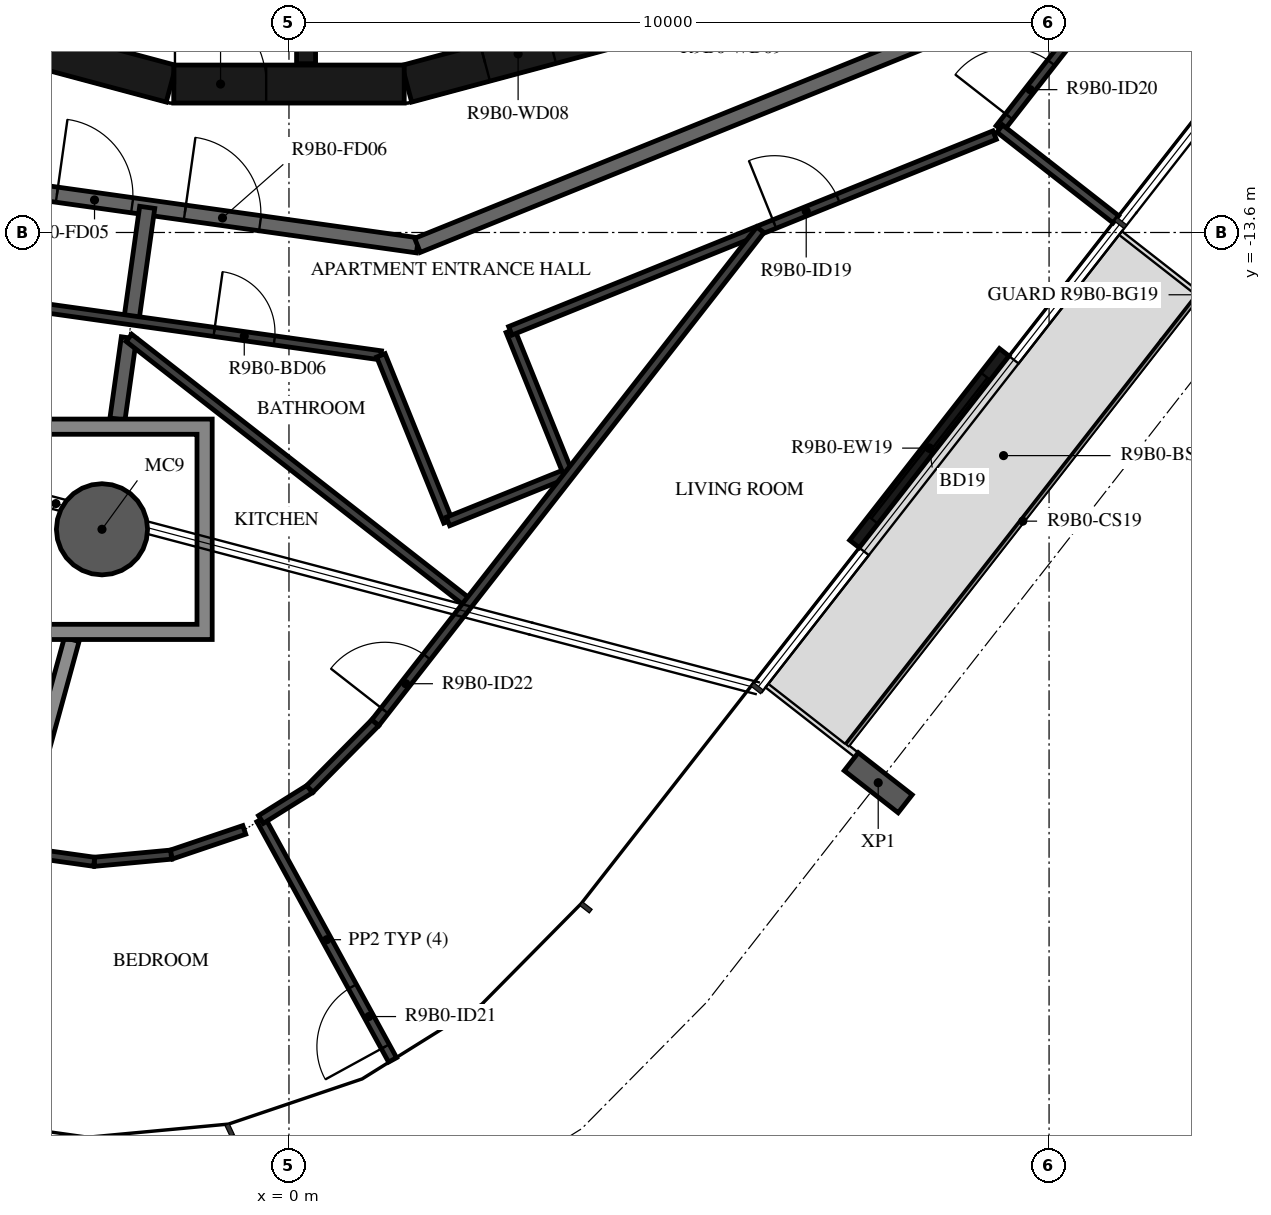
"""IFC4 building model, lengths in metres.
Left out: names, types, materials, properties, quantities, classifications, styles, units other than length and angle.
Written with IfcOpenShell. Run it as: python <this file> out.ifc"""

import sys

from ifc_helpers import new_model, si_unit, direction, frame, frame_2d, origin, origin_2d, place, context, subcontext, project, spatial, polyline, rectangle, hollow_circle, i_section, outline, extrude, element, fill, save


model = new_model("IFC4")
c1 = context("Model", 3, precision=1e-05, world=origin(), true_north=direction((0.0, 1.0)))
c2 = subcontext(c1, "Body", "Model", "MODEL_VIEW")
j1 = project(units=[si_unit("LENGTHUNIT", "METRE"), si_unit("PLANEANGLEUNIT", "RADIAN")], contexts=[c1])
p1 = place(None, origin())
s1 = spatial("IfcSite", under=j1, at=p1, CompositionType="ELEMENT")
p2 = place(p1, origin())
s2 = spatial("IfcBuilding", under=s1, at=p2, CompositionType="ELEMENT")
p3 = place(p2, frame((0.0, 0.0, 347.0)))
s3 = spatial("IfcBuildingStorey", under=s2, at=p3, CompositionType="ELEMENT", Elevation=347.0)
p4 = place(p3, frame((-2.46, -17.505, -0.38), z_axis=(0.0, 0.0, 1.0), x_axis=(1.0, 0.0, 0.0)))
e1 = element("IfcColumn", 1, at=p4, inside=s3, PredefinedType="COLUMN", context=c2, shape_type="SweptSolid", body=[
    extrude(hollow_circle(Radius=0.6, WallThickness=0.03, at=origin_2d()), origin(), (0.0, 0.0, 1.0), 3.5),
])
p5 = place(p3, frame((7.752, -20.839, -0.38), z_axis=(0.0, 0.0, 1.0), x_axis=(-0.615661060634, -0.788011077599, 0.0)))
e2 = element("IfcColumn", 2, at=p5, inside=s3, PredefinedType="COLUMN", context=c2, shape_type="SweptSolid", body=[
    extrude(i_section(OverallWidth=0.3, OverallDepth=0.9, WebThickness=0.019, FlangeThickness=0.035, FilletRadius=0.03, at=origin_2d()), origin(), (0.0, 0.0, 1.0), 3.5),
])
p6 = place(p3, frame((7.44, -17.698, 0.0), z_axis=(0.0, 0.0, 1.0), x_axis=(0.615666248856, 0.788007024093, 0.0)))
e3 = element("IfcWall", 3, at=p6, inside=s3, PredefinedType="STANDARD", context=c2, shape_type="SweptSolid", body=[
    extrude(rectangle(XDim=3.2, YDim=0.16, at=frame_2d((1.6, 0.0))), origin(), (0.0, 0.0, 1.0), 3.12),
])
p7 = place(p6, frame((0.4, 0.0, 0.0)))
e4 = element("IfcOpeningElement", 4, at=p7, cuts=e3, PredefinedType="OPENING", context=c2, shape_type="SweptSolid", body=[
    extrude(rectangle(XDim=2.4, YDim=2.4, at=frame_2d((1.2, 1.2))), frame((0.0, 0.09, 0.0), z_axis=(0.0, -1.0, 0.0), x_axis=(1.0, 0.0, 0.0)), (0.0, 0.0, 1.0), 0.18),
])
p8 = place(p3, frame((1.55, -11.643, 0.0), z_axis=(0.0, 0.0, 1.0), x_axis=(0.965948410781, 0.258734743916, 0.0)))
e5 = element("IfcWall", 5, at=p8, inside=s3, PredefinedType="SHEAR", context=c2, shape_type="SweptSolid", body=[
    extrude(rectangle(XDim=3.033, YDim=0.5, at=frame_2d((1.516, 0.0))), origin(), (0.0, 0.0, 1.0), 3.12),
])
p9 = place(p8, frame((1.066, 0.0, 0.0)))
e6 = element("IfcOpeningElement", 6, at=p9, cuts=e5, PredefinedType="OPENING", context=c2, shape_type="SweptSolid", body=[
    extrude(rectangle(XDim=0.9, YDim=2.1, at=frame_2d((0.45, 1.05))), frame((0.0, 0.26, 0.0), z_axis=(0.0, -1.0, 0.0), x_axis=(1.0, 0.0, 0.0)), (0.0, 0.0, 1.0), 0.52),
])
p10 = place(p3, frame((-4.479, -10.858, 0.0), z_axis=(0.0, 0.0, 1.0), x_axis=(0.965948410781, -0.258734743916, 0.0)))
e7 = element("IfcWall", 7, at=p10, inside=s3, PredefinedType="SHEAR", context=c2, shape_type="SweptSolid", body=[
    extrude(rectangle(XDim=3.033, YDim=0.5, at=frame_2d((1.516, 0.0))), origin(), (0.0, 0.0, 1.0), 3.12),
])
p11 = place(p3, frame((-1.516, -11.647, 0.0), z_axis=(0.0, 0.0, 1.0), x_axis=(1.0, 0.0, 0.0)))
e8 = element("IfcWall", 8, at=p11, inside=s3, PredefinedType="SHEAR", context=c2, shape_type="SweptSolid", body=[
    extrude(rectangle(XDim=3.033, YDim=0.5, at=frame_2d((1.516, 0.0))), origin(), (0.0, 0.0, 1.0), 3.12),
])
p12 = place(p11, frame((0.016, 0.0, 0.0)))
e9 = element("IfcOpeningElement", 9, at=p12, cuts=e8, PredefinedType="OPENING", context=c2, shape_type="SweptSolid", body=[
    extrude(rectangle(XDim=1.2, YDim=2.1, at=frame_2d((0.6, 1.05))), frame((0.0, 0.26, 0.0), z_axis=(0.0, -1.0, 0.0), x_axis=(1.0, 0.0, 0.0)), (0.0, 0.0, 1.0), 0.52),
])
p13 = place(p3, frame((0.225, -8.97, 0.0), z_axis=(0.0, 0.0, 1.0), x_axis=(0.0, -1.0, 0.0)))
e10 = element("IfcWall", 10, at=p13, inside=s3, PredefinedType="SHEAR", context=c2, shape_type="SweptSolid", body=[
    extrude(rectangle(XDim=2.41, YDim=0.25, at=frame_2d((1.205, 0.0))), origin(), (0.0, 0.0, 1.0), 3.12),
])
p14 = place(p3, frame((-5.42, -12.77, 0.0), z_axis=(0.0, 0.0, 1.0), x_axis=(0.990270565508, -0.139155334385, 0.0)))
e11 = element("IfcWall", 11, at=p14, inside=s3, PredefinedType="STANDARD", context=c2, shape_type="SweptSolid", body=[
    extrude(rectangle(XDim=7.181, YDim=0.2, at=frame_2d((3.59, 0.0))), origin(), (0.0, 0.0, 1.0), 3.12),
])
p15 = place(p14, frame((2.39, 0.0, 0.0)))
e12 = element("IfcOpeningElement", 12, at=p15, cuts=e11, PredefinedType="OPENING", context=c2, shape_type="SweptSolid", body=[
    extrude(rectangle(XDim=1.0, YDim=2.1, at=frame_2d((0.5, 1.05))), frame((0.0, 0.11, 0.0), z_axis=(0.0, -1.0, 0.0), x_axis=(1.0, 0.0, 0.0)), (0.0, 0.0, 1.0), 0.22),
])
p16 = place(p14, frame((4.091, 0.0, 0.0)))
e13 = element("IfcOpeningElement", 13, at=p16, cuts=e11, PredefinedType="OPENING", context=c2, shape_type="SweptSolid", body=[
    extrude(rectangle(XDim=1.0, YDim=2.1, at=frame_2d((0.5, 1.05))), frame((0.0, 0.11, 0.0), z_axis=(0.0, -1.0, 0.0), x_axis=(1.0, 0.0, 0.0)), (0.0, 0.0, 1.0), 0.22),
])
p17 = place(p3, frame((1.691, -13.769, 0.0), z_axis=(0.0, 0.0, 1.0), x_axis=(0.92717916932, 0.374618189599, 0.0)))
e14 = element("IfcWall", 14, at=p17, inside=s3, PredefinedType="STANDARD", context=c2, shape_type="SweptSolid", body=[
    extrude(rectangle(XDim=7.181, YDim=0.2, at=frame_2d((3.591, 0.0))), origin(), (0.0, 0.0, 1.0), 3.12),
])
p18 = place(p3, frame((-2.073, -14.755, 0.0), z_axis=(0.0, 0.0, 1.0), x_axis=(0.139005431033, 0.990291618738, 0.0)))
e15 = element("IfcWall", 15, at=p18, inside=s3, PredefinedType="STANDARD", context=c2, shape_type="SweptSolid", body=[
    extrude(rectangle(XDim=1.5, YDim=0.2, at=frame_2d((0.75, 0.0))), origin(), (0.0, 0.0, 1.0), 3.12),
])
p19 = place(p3, frame((-2.256, -16.055, 0.0), z_axis=(0.0, 0.0, 1.0), x_axis=(0.139109268657, 0.990277037689, 0.0)))
e16 = element("IfcWall", 16, at=p19, inside=s3, PredefinedType="STANDARD", context=c2, shape_type="SweptSolid", body=[
    extrude(rectangle(XDim=1.079, YDim=0.2, at=frame_2d((0.54, 0.0))), origin(), (0.0, 0.0, 1.0), 3.12),
])
p20 = place(p3, frame((-4.574, -25.21, 0.0), z_axis=(0.0, 0.0, 1.0), x_axis=(0.264579024648, 0.964364007892, 0.0)))
e17 = element("IfcWall", 17, at=p20, inside=s3, PredefinedType="STANDARD", context=c2, shape_type="SweptSolid", body=[
    extrude(rectangle(XDim=6.486, YDim=0.2, at=frame_2d((3.243, 0.0))), origin(), (0.0, 0.0, 1.0), 2.73),
])
p21 = place(p3, frame((-6.027, -14.199, 0.0), z_axis=(0.0, 0.0, 1.0), x_axis=(0.990271617837, -0.139147845494, 0.0)))
e18 = element("IfcWall", 18, at=p21, inside=s3, PredefinedType="PARTITIONING", context=c2, shape_type="SweptSolid", body=[
    extrude(rectangle(XDim=7.308, YDim=0.12, at=frame_2d((3.654, 0.0))), origin(), (0.0, 0.0, 1.0), 3.12),
])
p22 = place(p21, frame((5.093, 0.0, 0.0)))
e19 = element("IfcOpeningElement", 19, at=p22, cuts=e18, PredefinedType="OPENING", context=c2, shape_type="SweptSolid", body=[
    extrude(rectangle(XDim=0.8, YDim=2.1, at=frame_2d((0.4, 1.05))), frame((0.0, 0.07, 0.0), z_axis=(0.0, -1.0, 0.0), x_axis=(1.0, 0.0, 0.0)), (0.0, 0.0, 1.0), 0.14),
])
p23 = place(p3, frame((1.209, -15.216, 0.0), z_axis=(0.0, 0.0, 1.0), x_axis=(0.374531550488, -0.927214170345, 0.0)))
e20 = element("IfcWall", 20, at=p23, inside=s3, PredefinedType="PARTITIONING", context=c2, shape_type="SweptSolid", body=[
    extrude(rectangle(XDim=2.357, YDim=0.12, at=frame_2d((1.179, 0.0))), origin(), (0.0, 0.0, 1.0), 3.12),
])
p24 = place(p3, frame((2.092, -17.402, 0.0), z_axis=(0.0, 0.0, 1.0), x_axis=(0.927153589835, 0.374681492546, 0.0)))
e21 = element("IfcWall", 21, at=p24, inside=s3, PredefinedType="PARTITIONING", context=c2, shape_type="SweptSolid", body=[
    extrude(rectangle(XDim=1.7, YDim=0.12, at=frame_2d((0.85, 0.0))), origin(), (0.0, 0.0, 1.0), 3.12),
])
p25 = place(p3, frame((3.668, -16.765, 0.0), z_axis=(0.0, 0.0, 1.0), x_axis=(-0.374621045498, 0.927178015416, 0.0)))
e22 = element("IfcWall", 22, at=p25, inside=s3, PredefinedType="PARTITIONING", context=c2, shape_type="SweptSolid", body=[
    extrude(rectangle(XDim=2.018, YDim=0.12, at=frame_2d((1.009, 0.0))), origin(), (0.0, 0.0, 1.0), 3.12),
])
p26 = place(p3, frame((2.912, -14.894, 0.0), z_axis=(0.0, 0.0, 1.0), x_axis=(0.927182280165, 0.374610490174, 0.0)))
e23 = element("IfcWall", 23, at=p26, inside=s3, PredefinedType="PARTITIONING", context=c2, shape_type="SweptSolid", body=[
    extrude(rectangle(XDim=6.872, YDim=0.12, at=frame_2d((3.436, 0.0))), origin(), (0.0, 0.0, 1.0), 3.12),
])
p27 = place(p26, frame((3.748, 0.0, 0.0)))
e24 = element("IfcOpeningElement", 24, at=p27, cuts=e23, PredefinedType="OPENING", context=c2, shape_type="SweptSolid", body=[
    extrude(rectangle(XDim=0.9, YDim=2.1, at=frame_2d((0.45, 1.05))), frame((0.0, 0.07, 0.0), z_axis=(0.0, -1.0, 0.0), x_axis=(1.0, 0.0, 0.0)), (0.0, 0.0, 1.0), 0.14),
])
p28 = place(p3, frame((9.351, -12.233, 0.0), z_axis=(0.0, 0.0, 1.0), x_axis=(0.615678207218, 0.787997680933, 0.0)))
e25 = element("IfcWall", 25, at=p28, inside=s3, PredefinedType="PARTITIONING", context=c2, shape_type="SweptSolid", body=[
    extrude(rectangle(XDim=7.765, YDim=0.12, at=frame_2d((3.883, 0.0))), origin(), (0.0, 0.0, 1.0), 3.12),
])
p29 = place(p28, frame((0.2, 0.0, 0.0)))
e26 = element("IfcOpeningElement", 26, at=p29, cuts=e25, PredefinedType="OPENING", context=c2, shape_type="SweptSolid", body=[
    extrude(rectangle(XDim=0.9, YDim=2.1, at=frame_2d((0.45, 1.05))), frame((0.0, 0.07, 0.0), z_axis=(0.0, -1.0, 0.0), x_axis=(1.0, 0.0, 0.0)), (0.0, 0.0, 1.0), 0.14),
])
p30 = place(p3, frame((-0.588, -21.459, 0.0), z_axis=(0.0, 0.0, 1.0), x_axis=(-0.94737753159, -0.320118435332, 0.0)))
e27 = element("IfcWall", 27, at=p30, inside=s3, PredefinedType="PARTITIONING", context=c2, shape_type="SweptSolid", body=[
    extrude(rectangle(XDim=1.016, YDim=0.12, at=frame_2d((0.508, 0.0))), origin(), (0.0, 0.0, 1.0), 3.12),
])
p31 = place(p3, frame((-1.55, -21.785, 0.0), z_axis=(0.0, 0.0, 1.0), x_axis=(-0.995667655176, -0.092983441736, 0.0)))
e28 = element("IfcWall", 28, at=p31, inside=s3, PredefinedType="PARTITIONING", context=c2, shape_type="SweptSolid", body=[
    extrude(rectangle(XDim=1.016, YDim=0.12, at=frame_2d((0.508, 0.0))), origin(), (0.0, 0.0, 1.0), 3.12),
])
p32 = place(p3, frame((-2.562, -21.879, 0.0), z_axis=(0.0, 0.0, 1.0), x_axis=(-0.990273657549, 0.139133328736, 0.0)))
e29 = element("IfcWall", 29, at=p32, inside=s3, PredefinedType="PARTITIONING", context=c2, shape_type="SweptSolid", body=[
    extrude(rectangle(XDim=1.016, YDim=0.12, at=frame_2d((0.508, 0.0))), origin(), (0.0, 0.0, 1.0), 3.12),
])
p33 = place(p3, frame((1.363, -24.485, 0.0), z_axis=(0.0, 0.0, 1.0), x_axis=(-0.480374148719, 0.877063667725, 0.0)))
e30 = element("IfcWall", 30, at=p33, inside=s3, PredefinedType="PARTITIONING", context=c2, shape_type="SweptSolid", body=[
    extrude(rectangle(XDim=3.606, YDim=0.12, at=frame_2d((1.803, 0.0))), origin(), (0.0, 0.0, 1.0), 2.73),
])
p34 = place(p33, frame((0.2, 0.0, 0.0)))
e31 = element("IfcOpeningElement", 31, at=p34, cuts=e30, PredefinedType="OPENING", context=c2, shape_type="SweptSolid", body=[
    extrude(rectangle(XDim=0.9, YDim=2.1, at=frame_2d((0.45, 1.05))), frame((0.0, 0.07, 0.0), z_axis=(0.0, -1.0, 0.0), x_axis=(1.0, 0.0, 0.0)), (0.0, 0.0, 1.0), 0.14),
])
p35 = place(p3, frame((2.363, -18.478, 0.0), z_axis=(0.0, 0.0, 1.0), x_axis=(-0.788010669333, 0.615661583191, 0.0)))
e32 = element("IfcWall", 32, at=p35, inside=s3, PredefinedType="PARTITIONING", context=c2, shape_type="SweptSolid", body=[
    extrude(rectangle(XDim=5.672, YDim=0.12, at=frame_2d((2.836, 0.0))), origin(), (0.0, 0.0, 1.0), 3.12),
])
p36 = place(p3, frame((-0.369, -21.323, 0.0), z_axis=(0.0, 0.0, 1.0), x_axis=(0.847998304005, 0.529998940003, 0.0)))
e33 = element("IfcWall", 33, at=p36, inside=s3, PredefinedType="PARTITIONING", context=c2, shape_type="SweptSolid", body=[
    extrude(rectangle(XDim=0.758, YDim=0.12, at=frame_2d((0.379, 0.0))), origin(), (0.0, 0.0, 1.0), 3.12),
])
p37 = place(p3, frame((0.274, -20.921, 0.0), z_axis=(0.0, 0.0, 1.0), x_axis=(0.702915150142, 0.711273710818, 0.0)))
e34 = element("IfcWall", 34, at=p37, inside=s3, PredefinedType="PARTITIONING", context=c2, shape_type="SweptSolid", body=[
    extrude(rectangle(XDim=1.227, YDim=0.12, at=frame_2d((0.613, 0.0))), origin(), (0.0, 0.0, 1.0), 3.12),
])
p38 = place(p3, frame((1.136, -20.049, 0.0), z_axis=(0.0, 0.0, 1.0), x_axis=(0.615662465763, 0.788009979792, 0.0)))
e35 = element("IfcWall", 35, at=p38, inside=s3, PredefinedType="PARTITIONING", context=c2, shape_type="SweptSolid", body=[
    extrude(rectangle(XDim=8.229, YDim=0.12, at=frame_2d((4.114, 0.0))), origin(), (0.0, 0.0, 1.0), 3.12),
])
p39 = place(p38, frame((0.2, 0.0, 0.0)))
e36 = element("IfcOpeningElement", 36, at=p39, cuts=e35, PredefinedType="OPENING", context=c2, shape_type="SweptSolid", body=[
    extrude(rectangle(XDim=0.9, YDim=2.1, at=frame_2d((0.45, 1.05))), frame((0.0, 0.07, 0.0), z_axis=(0.0, -1.0, 0.0), x_axis=(1.0, 0.0, 0.0)), (0.0, 0.0, 1.0), 0.14),
])
p40 = place(p3, frame((10.878, -13.427, 0.0), z_axis=(0.0, 0.0, 1.0), x_axis=(-0.787980458379, 0.615700249483, 0.0)))
e37 = element("IfcWall", 37, at=p40, inside=s3, PredefinedType="PARTITIONING", context=c2, shape_type="SweptSolid", body=[
    extrude(rectangle(XDim=1.939, YDim=0.12, at=frame_2d((0.969, 0.0))), origin(), (0.0, 0.0, 1.0), 2.73),
])
p41 = place(p3, origin())
e38 = element("IfcWall", 38, at=p41, inside=s3, PredefinedType="STANDARD", context=c2, shape_type="SweptSolid", body=[
    extrude(outline(polyline([(-1.01, -16.055), (-1.01, -18.955), (-3.91, -18.955), (-3.91, -16.055), (-1.01, -16.055)]), holes=[polyline([(-3.71, -18.755), (-1.21, -18.755), (-1.21, -16.255), (-3.71, -16.255), (-3.71, -18.755)])]), origin(), (0.0, 0.0, 1.0), 3.12),
])
p42 = place(p7, origin())
e39 = element("IfcDoor", 39, at=p42, inside=s3, OperationType="DOUBLE_DOOR_SLIDING", PredefinedType="DOOR", context=c2, shape_type="SweptSolid", body=[
    extrude(rectangle(XDim=2.4, YDim=2.4, at=frame_2d((1.2, 1.2))), frame((0.0, 0.025, 0.0), z_axis=(0.0, -1.0, 0.0), x_axis=(1.0, 0.0, 0.0)), (0.0, 0.0, 1.0), 0.05),
])
fill(e4, e39)
p43 = place(p12, origin())
e40 = element("IfcDoor", 40, at=p43, inside=s3, OperationType="SINGLE_SWING_RIGHT", PredefinedType="DOOR", context=c2, shape_type="SweptSolid", body=[
    extrude(rectangle(XDim=1.2, YDim=2.1, at=frame_2d((0.6, 1.05))), frame((0.0, 0.025, 0.0), z_axis=(0.0, -1.0, 0.0), x_axis=(1.0, 0.0, 0.0)), (0.0, 0.0, 1.0), 0.05),
])
fill(e9, e40)
p44 = place(p9, origin())
e41 = element("IfcDoor", 41, at=p44, inside=s3, OperationType="SINGLE_SWING_RIGHT", PredefinedType="DOOR", context=c2, shape_type="SweptSolid", body=[
    extrude(rectangle(XDim=0.9, YDim=2.1, at=frame_2d((0.45, 1.05))), frame((0.0, 0.025, 0.0), z_axis=(0.0, -1.0, 0.0), x_axis=(1.0, 0.0, 0.0)), (0.0, 0.0, 1.0), 0.05),
])
fill(e6, e41)
p45 = place(p15, origin())
e42 = element("IfcDoor", 42, at=p45, inside=s3, OperationType="SINGLE_SWING_RIGHT", PredefinedType="DOOR", context=c2, shape_type="SweptSolid", body=[
    extrude(rectangle(XDim=1.0, YDim=2.1, at=frame_2d((0.5, 1.05))), frame((0.0, 0.025, 0.0), z_axis=(0.0, -1.0, 0.0), x_axis=(1.0, 0.0, 0.0)), (0.0, 0.0, 1.0), 0.05),
])
fill(e12, e42)
p46 = place(p16, origin())
e43 = element("IfcDoor", 43, at=p46, inside=s3, OperationType="SINGLE_SWING_RIGHT", PredefinedType="DOOR", context=c2, shape_type="SweptSolid", body=[
    extrude(rectangle(XDim=1.0, YDim=2.1, at=frame_2d((0.5, 1.05))), frame((0.0, 0.025, 0.0), z_axis=(0.0, -1.0, 0.0), x_axis=(1.0, 0.0, 0.0)), (0.0, 0.0, 1.0), 0.05),
])
fill(e13, e43)
p47 = place(p22, origin())
e44 = element("IfcDoor", 44, at=p47, inside=s3, OperationType="SINGLE_SWING_LEFT", PredefinedType="DOOR", context=c2, shape_type="SweptSolid", body=[
    extrude(rectangle(XDim=0.8, YDim=2.1, at=frame_2d((0.4, 1.05))), frame((0.0, 0.025, 0.0), z_axis=(0.0, -1.0, 0.0), x_axis=(1.0, 0.0, 0.0)), (0.0, 0.0, 1.0), 0.05),
])
fill(e19, e44)
p48 = place(p27, origin())
e45 = element("IfcDoor", 45, at=p48, inside=s3, OperationType="SINGLE_SWING_LEFT", PredefinedType="DOOR", context=c2, shape_type="SweptSolid", body=[
    extrude(rectangle(XDim=0.9, YDim=2.1, at=frame_2d((0.45, 1.05))), frame((0.0, 0.025, 0.0), z_axis=(0.0, -1.0, 0.0), x_axis=(1.0, 0.0, 0.0)), (0.0, 0.0, 1.0), 0.05),
])
fill(e24, e45)
p49 = place(p29, origin())
e46 = element("IfcDoor", 46, at=p49, inside=s3, OperationType="SINGLE_SWING_LEFT", PredefinedType="DOOR", context=c2, shape_type="SweptSolid", body=[
    extrude(rectangle(XDim=0.9, YDim=2.1, at=frame_2d((0.45, 1.05))), frame((0.0, 0.025, 0.0), z_axis=(0.0, -1.0, 0.0), x_axis=(1.0, 0.0, 0.0)), (0.0, 0.0, 1.0), 0.05),
])
fill(e26, e46)
p50 = place(p34, origin())
e47 = element("IfcDoor", 47, at=p50, inside=s3, OperationType="SINGLE_SWING_LEFT", PredefinedType="DOOR", context=c2, shape_type="SweptSolid", body=[
    extrude(rectangle(XDim=0.9, YDim=2.1, at=frame_2d((0.45, 1.05))), frame((0.0, 0.025, 0.0), z_axis=(0.0, -1.0, 0.0), x_axis=(1.0, 0.0, 0.0)), (0.0, 0.0, 1.0), 0.05),
])
fill(e31, e47)
p51 = place(p39, origin())
e48 = element("IfcDoor", 48, at=p51, inside=s3, OperationType="SINGLE_SWING_RIGHT", PredefinedType="DOOR", context=c2, shape_type="SweptSolid", body=[
    extrude(rectangle(XDim=0.9, YDim=2.1, at=frame_2d((0.45, 1.05))), frame((0.0, 0.025, 0.0), z_axis=(0.0, -1.0, 0.0), x_axis=(1.0, 0.0, 0.0)), (0.0, 0.0, 1.0), 0.05),
])
fill(e36, e48)
save(model, sys.argv[1])
